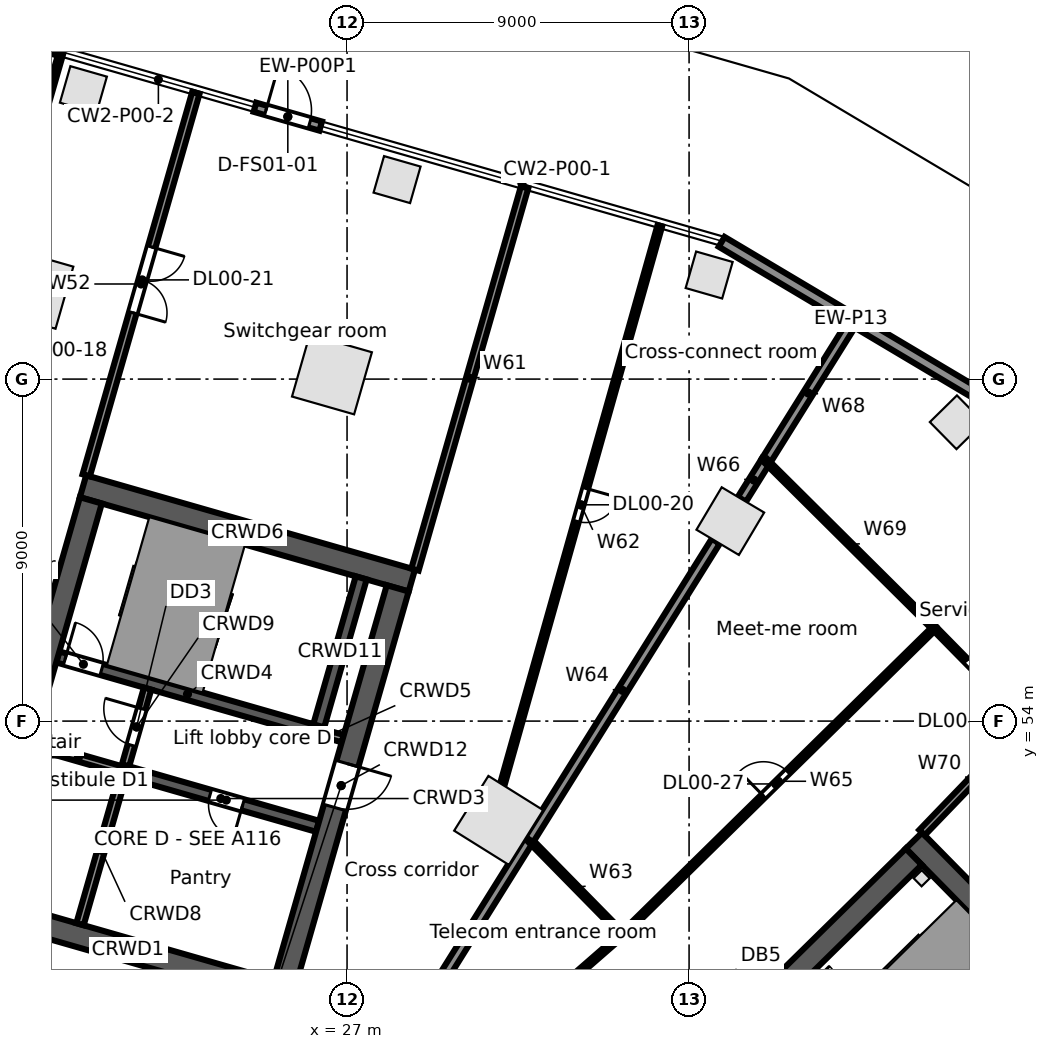
"""IFC4 building model, lengths in metres.
Left out: names, types, materials, properties, quantities, classifications, styles, units other than length and angle.
Written with IfcOpenShell. Run it as: python <this file> out.ifc"""

import sys

from ifc_helpers import new_model, si_unit, direction, frame, frame_2d, origin, origin_2d, place, context, subcontext, project, spatial, rectangle, extrude, element, fill, save


model = new_model("IFC4")
c1 = context("Model", 3, precision=1e-05, world=origin(), true_north=direction((0.0, 1.0)))
c2 = subcontext(c1, "Body", "Model", "MODEL_VIEW")
j1 = project(units=[si_unit("LENGTHUNIT", "METRE"), si_unit("PLANEANGLEUNIT", "RADIAN")], contexts=[c1])
p1 = place(None, origin())
s1 = spatial("IfcSite", under=j1, at=p1, CompositionType="ELEMENT")
p2 = place(p1, origin())
s2 = spatial("IfcBuilding", under=s1, at=p2, CompositionType="ELEMENT")
p3 = place(p2, origin())
s3 = spatial("IfcBuildingStorey", under=s2, at=p3, CompositionType="ELEMENT", Elevation=0.0)
p4 = place(p3, frame((37.085, 59.262, 0.0), z_axis=(0.0, 0.0, 1.0), x_axis=(-0.859406411501, 0.511293086077, 0.0)))
e1 = element("IfcColumn", 1, at=p4, inside=s3, PredefinedType="COLUMN", context=c2, shape_type="SweptSolid", body=[
    extrude(rectangle(XDim=1.3, YDim=1.3, at=origin_2d()), origin(), (0.0, 0.0, 1.0), 6.5),
])
for number, where, z_axis, x_axis in (
    (2, (26.603, 63.124, 0.0), (0.0, 0.0, 1.0), (-0.961, 0.276, 0.0)),
    (3, (18.746, 65.376, 0.0), (0.0, 0.0, 1.0), (-0.961, 0.276, 0.0)),
    (4, (30.99, 51.386, 0.0), (0.0, 0.0, 1.0), (0.53, 0.848, 0.0)),
):
    element("IfcColumn", number, at=place(p3, frame(where, z_axis=z_axis, x_axis=x_axis)), inside=s3, PredefinedType="COLUMN", context=c2, shape_type="SweptSolid", body=[
        extrude(rectangle(XDim=1.7, YDim=1.7, at=origin_2d()), origin(), (0.0, 0.0, 1.0), 6.5),
    ])
for number, where, z_axis, x_axis in (
    (5, (36.528, 65.739, 0.0), (0.0, 0.0, 1.0), (-0.961, 0.276, 0.0)),
    (6, (28.316, 68.25, 0.0), (0.0, 0.0, 1.0), (-0.961, 0.276, 0.0)),
    (7, (20.062, 70.616, 0.0), (0.0, 0.0, 1.0), (-0.961, 0.276, 0.0)),
    (8, (43.042, 61.863, 0.0), (0.0, 0.0, 1.0), (-0.701, 0.713, 0.0)),
):
    element("IfcColumn", number, at=place(p3, frame(where, z_axis=z_axis, x_axis=x_axis)), inside=s3, PredefinedType="COLUMN", context=c2, shape_type="SweptSolid", body=[
        extrude(rectangle(XDim=1.0, YDim=1.0, at=origin_2d()), origin(), (0.0, 0.0, 1.0), 6.5),
    ])
p5 = place(p3, frame((36.858, 66.612, 0.0), z_axis=(0.0, 0.0, 1.0), x_axis=(0.85940790562, -0.51129057468, 0.0)))
e9 = element("IfcWall", 9, at=p5, inside=s3, PredefinedType="STANDARD", context=c2, shape_type="SweptSolid", body=[
    extrude(rectangle(XDim=7.906, YDim=0.3, at=frame_2d((3.953, 0.0))), origin(), (0.0, 0.0, 1.0), 6.15),
])
p6 = place(p3, frame((24.576, 70.154, 0.0), z_axis=(0.0, 0.0, 1.0), x_axis=(0.961267609379, -0.275616732363, 0.0)))
e10 = element("IfcWall", 10, at=p6, inside=s3, PredefinedType="STANDARD", context=c2, shape_type="SweptSolid", body=[
    extrude(rectangle(XDim=1.8, YDim=0.25, at=frame_2d((0.9, 0.0))), origin(), (0.0, 0.0, 1.0), 6.15),
])
p7 = place(p6, frame((0.3, 0.0, 0.0)))
e11 = element("IfcOpeningElement", 11, at=p7, cuts=e10, PredefinedType="OPENING", context=c2, shape_type="SweptSolid", body=[
    extrude(rectangle(XDim=1.2, YDim=2.4, at=frame_2d((0.6, 1.2))), frame((0.0, 0.135, 0.0), z_axis=(0.0, -1.0, 0.0), x_axis=(1.0, 0.0, 0.0)), (0.0, 0.0, 1.0), 0.27),
])
p8 = place(p3, frame((14.881, 72.935, 0.0), z_axis=(0.0, 0.0, 1.0), x_axis=(0.961254793179, -0.275661427462, 0.0)))
e12 = element("IfcWall", 12, at=p8, inside=s3, PredefinedType="STANDARD", context=c2, shape_type="SweptSolid", body=[
    extrude(rectangle(XDim=4.8, YDim=0.25, at=frame_2d((2.4, 0.0))), origin(), (0.0, 0.0, 1.0), 6.15),
])
p9 = place(p8, frame((1.2, 0.0, 0.0)))
e13 = element("IfcOpeningElement", 13, at=p9, cuts=e12, PredefinedType="OPENING", context=c2, shape_type="SweptSolid", body=[
    extrude(rectangle(XDim=2.4, YDim=2.7, at=frame_2d((1.2, 1.35))), frame((0.0, 0.135, 0.0), z_axis=(0.0, -1.0, 0.0), x_axis=(1.0, 0.0, 0.0)), (0.0, 0.0, 1.0), 0.27),
])
p10 = place(p3, frame((41.917, 50.856, 0.0), z_axis=(0.0, 0.0, 1.0), x_axis=(0.700911255944, -0.713248491965, 0.0)))
e14 = element("IfcWall", 14, at=p10, inside=s3, PredefinedType="SOLIDWALL", context=c2, shape_type="SweptSolid", body=[
    extrude(rectangle(XDim=15.0, YDim=0.6, at=frame_2d((7.5, 0.0))), origin(), (0.0, 0.0, 1.0), 6.15),
])
p11 = place(p3, frame((32.07, 40.759, 0.0), z_axis=(0.0, 0.0, 1.0), x_axis=(0.713245344712, 0.70091445858, 0.0)))
e15 = element("IfcWall", 15, at=p11, inside=s3, PredefinedType="SOLIDWALL", context=c2, shape_type="SweptSolid", body=[
    extrude(rectangle(XDim=13.8, YDim=0.6, at=frame_2d((6.9, 0.0))), origin(), (0.0, 0.0, 1.0), 6.15),
])
p12 = place(p11, frame((6.3, 0.0, 0.0)))
e16 = element("IfcOpeningElement", 16, at=p12, cuts=e15, PredefinedType="OPENING", context=c2, shape_type="SweptSolid", body=[
    extrude(rectangle(XDim=1.2, YDim=2.1, at=frame_2d((0.6, 1.05))), frame((0.0, 0.31, 0.0), z_axis=(0.0, -1.0, 0.0), x_axis=(1.0, 0.0, 0.0)), (0.0, 0.0, 1.0), 0.62),
])
p13 = place(p3, frame((16.911, 49.221, 0.0), z_axis=(0.0, 0.0, 1.0), x_axis=(0.96126248289, -0.275634611374, 0.0)))
e17 = element("IfcWall", 17, at=p13, inside=s3, PredefinedType="SOLIDWALL", context=c2, shape_type="SweptSolid", body=[
    extrude(rectangle(XDim=9.0, YDim=0.6, at=frame_2d((4.5, 0.0))), origin(), (0.0, 0.0, 1.0), 6.15),
])
p14 = place(p3, frame((18.728, 53.382, 0.0), z_axis=(0.0, 0.0, 1.0), x_axis=(0.961247070632, -0.275688355216, 0.0)))
e18 = element("IfcWall", 18, at=p14, inside=s3, PredefinedType="SOLIDWALL", context=c2, shape_type="SweptSolid", body=[
    extrude(rectangle(XDim=2.5, YDim=0.2, at=frame_2d((1.25, 0.0))), origin(), (0.0, 0.0, 1.0), 6.15),
])
p15 = place(p3, frame((21.131, 52.692, 0.0), z_axis=(0.0, 0.0, 1.0), x_axis=(0.961271492568, -0.275603188616, 0.0)))
e19 = element("IfcWall", 19, at=p15, inside=s3, PredefinedType="SOLIDWALL", context=c2, shape_type="SweptSolid", body=[
    extrude(rectangle(XDim=5.3, YDim=0.3, at=frame_2d((2.65, 0.0))), origin(), (0.0, 0.0, 1.0), 6.15),
])
p16 = place(p15, frame((2.35, 0.0, 0.0)))
e20 = element("IfcOpeningElement", 20, at=p16, cuts=e19, PredefinedType="OPENING", context=c2, shape_type="SweptSolid", body=[
    extrude(rectangle(XDim=0.9, YDim=2.1, at=frame_2d((0.45, 1.05))), frame((0.0, 0.16, 0.0), z_axis=(0.0, -1.0, 0.0), x_axis=(1.0, 0.0, 0.0)), (0.0, 0.0, 1.0), 0.32),
])
p17 = place(p3, frame((19.389, 55.689, 0.0), z_axis=(0.0, 0.0, 1.0), x_axis=(0.961261397636, -0.275638396117, 0.0)))
e21 = element("IfcWall", 21, at=p17, inside=s3, PredefinedType="SOLIDWALL", context=c2, shape_type="SweptSolid", body=[
    extrude(rectangle(XDim=7.1, YDim=0.3, at=frame_2d((3.55, 0.0))), origin(), (0.0, 0.0, 1.0), 6.15),
])
p18 = place(p17, frame((0.2, 0.0, 0.0)))
e22 = element("IfcOpeningElement", 22, at=p18, cuts=e21, PredefinedType="OPENING", context=c2, shape_type="SweptSolid", body=[
    extrude(rectangle(XDim=1.0, YDim=2.1, at=frame_2d((0.5, 1.05))), frame((0.0, 0.16, 0.0), z_axis=(0.0, -1.0, 0.0), x_axis=(1.0, 0.0, 0.0)), (0.0, 0.0, 1.0), 0.32),
])
p19 = place(p3, frame((26.214, 53.732, 0.0), z_axis=(0.0, 0.0, 1.0), x_axis=(0.96122076476, -0.27578005982, 0.0)))
e23 = element("IfcWall", 23, at=p19, inside=s3, PredefinedType="SOLIDWALL", context=c2, shape_type="SweptSolid", body=[
    extrude(rectangle(XDim=0.7, YDim=0.2, at=frame_2d((0.35, 0.0))), origin(), (0.0, 0.0, 1.0), 6.15),
])
p20 = place(p3, frame((20.053, 60.18, 0.0), z_axis=(0.0, 0.0, 1.0), x_axis=(0.96126248289, -0.275634611374, 0.0)))
e24 = element("IfcWall", 24, at=p20, inside=s3, PredefinedType="SOLIDWALL", context=c2, shape_type="SweptSolid", body=[
    extrude(rectangle(XDim=9.0, YDim=0.6, at=frame_2d((4.5, 0.0))), origin(), (0.0, 0.0, 1.0), 6.15),
])
p21 = place(p3, frame((17.282, 49.427, 0.0), z_axis=(0.0, 0.0, 1.0), x_axis=(0.275631631629, 0.961263337304, 0.0)))
e25 = element("IfcWall", 25, at=p21, inside=s3, PredefinedType="SOLIDWALL", context=c2, shape_type="SweptSolid", body=[
    extrude(rectangle(XDim=10.8, YDim=0.6, at=frame_2d((5.4, 0.0))), origin(), (0.0, 0.0, 1.0), 6.15),
])
p22 = place(p21, frame((4.8, 0.0, 0.0)))
e26 = element("IfcOpeningElement", 26, at=p22, cuts=e25, PredefinedType="OPENING", context=c2, shape_type="SweptSolid", body=[
    extrude(rectangle(XDim=1.2, YDim=2.1, at=frame_2d((0.6, 1.05))), frame((0.0, 0.31, 0.0), z_axis=(0.0, -1.0, 0.0), x_axis=(1.0, 0.0, 0.0)), (0.0, 0.0, 1.0), 0.62),
])
p23 = place(p3, frame((19.973, 48.655, 0.0), z_axis=(0.0, 0.0, 1.0), x_axis=(0.275668441653, 0.961252781674, 0.0)))
e27 = element("IfcWall", 27, at=p23, inside=s3, PredefinedType="SOLIDWALL", context=c2, shape_type="SweptSolid", body=[
    extrude(rectangle(XDim=4.05, YDim=0.2, at=frame_2d((2.025, 0.0))), origin(), (0.0, 0.0, 1.0), 6.15),
])
p24 = place(p3, frame((21.172, 52.837, 0.0), z_axis=(0.0, 0.0, 1.0), x_axis=(0.275657676022, 0.961255868981, 0.0)))
e28 = element("IfcWall", 28, at=p24, inside=s3, PredefinedType="PARTITIONING", context=c2, shape_type="SweptSolid", body=[
    extrude(rectangle(XDim=2.1, YDim=0.2, at=frame_2d((1.05, 0.0))), origin(), (0.0, 0.0, 1.0), 6.15),
])
p25 = place(p24, frame((0.55, 0.0, 0.0)))
e29 = element("IfcOpeningElement", 29, at=p25, cuts=e28, PredefinedType="OPENING", context=c2, shape_type="SweptSolid", body=[
    extrude(rectangle(XDim=1.0, YDim=2.1, at=frame_2d((0.5, 1.05))), frame((0.0, 0.11, 0.0), z_axis=(0.0, -1.0, 0.0), x_axis=(1.0, 0.0, 0.0)), (0.0, 0.0, 1.0), 0.22),
])
p26 = place(p3, frame((26.256, 53.876, 0.0), z_axis=(0.0, 0.0, 1.0), x_axis=(0.275612739511, 0.961268754209, 0.0)))
e30 = element("IfcWall", 30, at=p26, inside=s3, PredefinedType="SOLIDWALL", context=c2, shape_type="SweptSolid", body=[
    extrude(rectangle(XDim=4.05, YDim=0.3, at=frame_2d((2.025, 0.0))), origin(), (0.0, 0.0, 1.0), 6.15),
])
p27 = place(p3, frame((25.356, 47.112, 0.0), z_axis=(0.0, 0.0, 1.0), x_axis=(0.275631631629, 0.961263337304, 0.0)))
e31 = element("IfcWall", 31, at=p27, inside=s3, PredefinedType="SOLIDWALL", context=c2, shape_type="SweptSolid", body=[
    extrude(rectangle(XDim=10.8, YDim=0.6, at=frame_2d((5.4, 0.0))), origin(), (0.0, 0.0, 1.0), 6.15),
])
p28 = place(p27, frame((4.8, 0.0, 0.0)))
e32 = element("IfcOpeningElement", 32, at=p28, cuts=e31, PredefinedType="OPENING", context=c2, shape_type="SweptSolid", body=[
    extrude(rectangle(XDim=1.2, YDim=2.1, at=frame_2d((0.6, 1.05))), frame((0.0, 0.31, 0.0), z_axis=(0.0, -1.0, 0.0), x_axis=(1.0, 0.0, 0.0)), (0.0, 0.0, 1.0), 0.62),
])
p29 = place(p3, frame((42.12, 49.864, 0.0), z_axis=(0.0, 0.0, 1.0), x_axis=(0.7009092643, -0.713250449154, 0.0)))
e33 = element("IfcColumn", 33, at=p29, inside=s3, PredefinedType="COLUMN", context=c2, shape_type="SweptSolid", body=[
    extrude(rectangle(XDim=0.3, YDim=0.3, at=origin_2d()), origin(), (0.0, 0.0, 1.0), 3.05),
])
p30 = place(p3, frame((14.9, 55.728, 0.0), z_axis=(0.0, 0.0, 1.0), x_axis=(0.277168807321, 0.960821238446, 0.0)))
e34 = element("IfcWall", 34, at=p30, inside=s3, PredefinedType="PARTITIONING", context=c2, shape_type="SweptSolid", body=[
    extrude(rectangle(XDim=16.474, YDim=0.125, at=frame_2d((8.237, 0.0))), origin(), (0.0, 0.0, 1.0), 5.212),
])
p31 = place(p30, frame((7.45, 0.0, 0.0)))
e35 = element("IfcOpeningElement", 35, at=p31, cuts=e34, PredefinedType="OPENING", context=c2, shape_type="SweptSolid", body=[
    extrude(rectangle(XDim=1.8, YDim=2.1, at=frame_2d((0.9, 1.05))), frame((0.0, 0.073, 0.0), z_axis=(0.0, -1.0, 0.0), x_axis=(1.0, 0.0, 0.0)), (0.0, 0.0, 1.0), 0.145),
])
p32 = place(p3, frame((20.136, 60.468, 0.0), z_axis=(0.0, 0.0, 1.0), x_axis=(0.275610651454, 0.96126935289, 0.0)))
e36 = element("IfcWall", 36, at=p32, inside=s3, PredefinedType="PARTITIONING", context=c2, shape_type="SweptSolid", body=[
    extrude(rectangle(XDim=10.475, YDim=0.2, at=frame_2d((5.237, 0.0))), origin(), (0.0, 0.0, 1.0), 5.43),
])
p33 = place(p32, frame((4.45, 0.0, 0.0)))
e37 = element("IfcOpeningElement", 37, at=p33, cuts=e36, PredefinedType="OPENING", context=c2, shape_type="SweptSolid", body=[
    extrude(rectangle(XDim=1.8, YDim=2.1, at=frame_2d((0.9, 1.05))), frame((0.0, 0.11, 0.0), z_axis=(0.0, -1.0, 0.0), x_axis=(1.0, 0.0, 0.0)), (0.0, 0.0, 1.0), 0.22),
])
p34 = place(p3, frame((26.338, 41.492, 0.0), z_axis=(0.0, 0.0, 1.0), x_axis=(0.753866696092, 0.657027400131, 0.0)))
e38 = element("IfcWall", 38, at=p34, inside=s3, PredefinedType="PARTITIONING", context=c2, shape_type="SweptSolid", body=[
    extrude(rectangle(XDim=10.493, YDim=0.125, at=frame_2d((5.246, 0.0))), origin(), (0.0, 0.0, 1.0), 5.23),
])
p35 = place(p34, frame((4.7, 0.0, 0.0)))
e39 = element("IfcOpeningElement", 39, at=p35, cuts=e38, PredefinedType="OPENING", context=c2, shape_type="SweptSolid", body=[
    extrude(rectangle(XDim=0.9, YDim=2.1, at=frame_2d((0.45, 1.05))), frame((0.0, 0.073, 0.0), z_axis=(0.0, -1.0, 0.0), x_axis=(1.0, 0.0, 0.0)), (0.0, 0.0, 1.0), 0.145),
])
p36 = place(p3, frame((26.456, 42.338, 0.0), z_axis=(0.0, 0.0, 1.0), x_axis=(0.529866075757, 0.848081329686, 0.0)))
e40 = element("IfcWall", 40, at=p36, inside=s3, PredefinedType="PARTITIONING", context=c2, shape_type="SweptSolid", body=[
    extrude(rectangle(XDim=10.076, YDim=0.25, at=frame_2d((5.038, 0.0))), origin(), (0.0, 0.0, 1.0), 5.212),
])
p37 = place(p3, frame((28.787, 57.987, 0.0), z_axis=(0.0, 0.0, 1.0), x_axis=(0.2756782675, 0.96124996376, 0.0)))
e41 = element("IfcWall", 41, at=p37, inside=s3, PredefinedType="PARTITIONING", context=c2, shape_type="SweptSolid", body=[
    extrude(rectangle(XDim=10.476, YDim=0.2, at=frame_2d((5.238, 0.0))), origin(), (0.0, 0.0, 1.0), 5.422),
])
p38 = place(p3, frame((31.084, 52.329, 0.0), z_axis=(0.0, 0.0, 1.0), x_axis=(0.271372887947, 0.962474288325, 0.0)))
e42 = element("IfcWall", 42, at=p38, inside=s3, PredefinedType="PARTITIONING", context=c2, shape_type="SweptSolid", body=[
    extrude(rectangle(XDim=15.281, YDim=0.125, at=frame_2d((7.641, 0.0))), origin(), (0.0, 0.0, 1.0), 5.422),
])
p39 = place(p38, frame((7.2, 0.0, 0.0)))
e43 = element("IfcOpeningElement", 43, at=p39, cuts=e42, PredefinedType="OPENING", context=c2, shape_type="SweptSolid", body=[
    extrude(rectangle(XDim=0.9, YDim=2.1, at=frame_2d((0.45, 1.05))), frame((0.0, 0.073, 0.0), z_axis=(0.0, -1.0, 0.0), x_axis=(1.0, 0.0, 0.0)), (0.0, 0.0, 1.0), 0.145),
])
p40 = place(p3, frame((31.795, 50.883, 0.0), z_axis=(0.0, 0.0, 1.0), x_axis=(0.700801832867, -0.713356005828, 0.0)))
e44 = element("IfcWall", 44, at=p40, inside=s3, PredefinedType="PARTITIONING", context=c2, shape_type="SweptSolid", body=[
    extrude(rectangle(XDim=3.5, YDim=0.125, at=frame_2d((1.75, 0.0))), origin(), (0.0, 0.0, 1.0), 5.23),
])
p41 = place(p3, frame((31.795, 50.883, 0.0), z_axis=(0.0, 0.0, 1.0), x_axis=(0.530015532415, 0.847987933522, 0.0)))
e45 = element("IfcWall", 45, at=p41, inside=s3, PredefinedType="PARTITIONING", context=c2, shape_type="SweptSolid", body=[
    extrude(rectangle(XDim=9.258, YDim=0.25, at=frame_2d((4.629, 0.0))), origin(), (0.0, 0.0, 1.0), 5.23),
])
p42 = place(p3, frame((34.248, 48.386, 0.0), z_axis=(0.0, 0.0, 1.0), x_axis=(0.713246685355, 0.700913094349, 0.0)))
e46 = element("IfcWall", 46, at=p42, inside=s3, PredefinedType="PARTITIONING", context=c2, shape_type="SweptSolid", body=[
    extrude(rectangle(XDim=11.501, YDim=0.125, at=frame_2d((5.75, 0.0))), origin(), (0.0, 0.0, 1.0), 5.33),
])
p43 = place(p42, frame((5.2, 0.0, 0.0)))
e47 = element("IfcOpeningElement", 47, at=p43, cuts=e46, PredefinedType="OPENING", context=c2, shape_type="SweptSolid", body=[
    extrude(rectangle(XDim=0.9, YDim=2.1, at=frame_2d((0.45, 1.05))), frame((0.0, 0.073, 0.0), z_axis=(0.0, -1.0, 0.0), x_axis=(1.0, 0.0, 0.0)), (0.0, 0.0, 1.0), 0.145),
])
p44 = place(p3, frame((37.391, 59.837, 0.0), z_axis=(0.0, 0.0, 1.0), x_axis=(0.529759350496, 0.848148000388, 0.0)))
e48 = element("IfcWall", 48, at=p44, inside=s3, PredefinedType="PARTITIONING", context=c2, shape_type="SweptSolid", body=[
    extrude(rectangle(XDim=1.191, YDim=0.25, at=frame_2d((0.595, 0.0))), origin(), (0.0, 0.0, 1.0), 6.15),
])
p45 = place(p3, frame((38.022, 60.847, 0.0), z_axis=(0.0, 0.0, 1.0), x_axis=(0.52983736322, 0.848099268091, 0.0)))
e49 = element("IfcWall", 49, at=p45, inside=s3, PredefinedType="PARTITIONING", context=c2, shape_type="SweptSolid", body=[
    extrude(rectangle(XDim=4.211, YDim=0.25, at=frame_2d((2.105, 0.0))), origin(), (0.0, 0.0, 1.0), 5.524),
])
p46 = place(p3, frame((38.022, 60.847, 0.0), z_axis=(0.0, 0.0, 1.0), x_axis=(0.709429785506, -0.704776120081, 0.0)))
e50 = element("IfcWall", 50, at=p46, inside=s3, PredefinedType="PARTITIONING", context=c2, shape_type="SweptSolid", body=[
    extrude(rectangle(XDim=6.243, YDim=0.125, at=frame_2d((3.122, 0.0))), origin(), (0.0, 0.0, 1.0), 5.518),
])
p47 = place(p3, frame((42.13, 51.066, 0.0), z_axis=(0.0, 0.0, 1.0), x_axis=(0.693124563472, 0.720817826855, 0.0)))
e51 = element("IfcWall", 51, at=p47, inside=s3, PredefinedType="PARTITIONING", context=c2, shape_type="SweptSolid", body=[
    extrude(rectangle(XDim=4.002, YDim=0.2, at=frame_2d((2.001, 0.0))), origin(), (0.0, 0.0, 1.0), 5.33),
])
p48 = place(p3, frame((42.451, 56.447, 0.0), z_axis=(0.0, 0.0, 1.0), x_axis=(0.700941316052, -0.713218950569, 0.0)))
e52 = element("IfcWall", 52, at=p48, inside=s3, PredefinedType="PARTITIONING", context=c2, shape_type="SweptSolid", body=[
    extrude(rectangle(XDim=3.5, YDim=0.125, at=frame_2d((1.75, 0.0))), origin(), (0.0, 0.0, 1.0), 6.15),
])
p49 = place(p48, frame((1.2, 0.0, 0.0)))
e53 = element("IfcOpeningElement", 53, at=p49, cuts=e52, PredefinedType="OPENING", context=c2, shape_type="SweptSolid", body=[
    extrude(rectangle(XDim=0.9, YDim=2.1, at=frame_2d((0.45, 1.05))), frame((0.0, 0.073, 0.0), z_axis=(0.0, -1.0, 0.0), x_axis=(1.0, 0.0, 0.0)), (0.0, 0.0, 1.0), 0.145),
])
p50 = place(p7, origin())
e54 = element("IfcDoor", 54, at=p50, inside=s3, OperationType="SINGLE_SWING_LEFT", PredefinedType="DOOR", context=c2, shape_type="SweptSolid", body=[
    extrude(rectangle(XDim=1.2, YDim=2.4, at=frame_2d((0.6, 1.2))), frame((0.0, 0.025, 0.0), z_axis=(0.0, -1.0, 0.0), x_axis=(1.0, 0.0, 0.0)), (0.0, 0.0, 1.0), 0.05),
])
fill(e11, e54)
p51 = place(p18, origin())
e55 = element("IfcDoor", 55, at=p51, inside=s3, OperationType="SINGLE_SWING_LEFT", PredefinedType="DOOR", context=c2, shape_type="SweptSolid", body=[
    extrude(rectangle(XDim=1.0, YDim=2.1, at=frame_2d((0.5, 1.05))), frame((0.0, 0.025, 0.0), z_axis=(0.0, -1.0, 0.0), x_axis=(1.0, 0.0, 0.0)), (0.0, 0.0, 1.0), 0.05),
])
fill(e22, e55)
p52 = place(p25, origin())
e56 = element("IfcDoor", 56, at=p52, inside=s3, OperationType="SINGLE_SWING_RIGHT", PredefinedType="DOOR", context=c2, shape_type="SweptSolid", body=[
    extrude(rectangle(XDim=1.0, YDim=2.1, at=frame_2d((0.5, 1.05))), frame((0.0, 0.025, 0.0), z_axis=(0.0, -1.0, 0.0), x_axis=(1.0, 0.0, 0.0)), (0.0, 0.0, 1.0), 0.05),
])
fill(e29, e56)
p53 = place(p28, frame((1.2, 0.0, 0.0), z_axis=(0.0, 0.0, 1.0), x_axis=(-1.0, 0.0, 0.0)))
e57 = element("IfcDoor", 57, at=p53, inside=s3, OperationType="SINGLE_SWING_LEFT", PredefinedType="DOOR", context=c2, shape_type="SweptSolid", body=[
    extrude(rectangle(XDim=1.2, YDim=2.1, at=frame_2d((0.6, 1.05))), frame((0.0, 0.025, 0.0), z_axis=(0.0, -1.0, 0.0), x_axis=(1.0, 0.0, 0.0)), (0.0, 0.0, 1.0), 0.05),
])
fill(e32, e57)
p54 = place(p16, frame((0.9, 0.0, 0.0), z_axis=(0.0, 0.0, 1.0), x_axis=(-1.0, 0.0, 0.0)))
e58 = element("IfcDoor", 58, at=p54, inside=s3, OperationType="SINGLE_SWING_LEFT", PredefinedType="DOOR", context=c2, shape_type="SweptSolid", body=[
    extrude(rectangle(XDim=0.9, YDim=2.1, at=frame_2d((0.45, 1.05))), frame((0.0, 0.025, 0.0), z_axis=(0.0, -1.0, 0.0), x_axis=(1.0, 0.0, 0.0)), (0.0, 0.0, 1.0), 0.05),
])
fill(e20, e58)
p55 = place(p39, frame((0.9, 0.0, 0.0), z_axis=(0.0, 0.0, 1.0), x_axis=(-1.0, 0.0, 0.0)))
e59 = element("IfcDoor", 59, at=p55, inside=s3, OperationType="SINGLE_SWING_LEFT", PredefinedType="DOOR", context=c2, shape_type="SweptSolid", body=[
    extrude(rectangle(XDim=0.9, YDim=2.1, at=frame_2d((0.45, 1.05))), frame((0.0, 0.025, 0.0), z_axis=(0.0, -1.0, 0.0), x_axis=(1.0, 0.0, 0.0)), (0.0, 0.0, 1.0), 0.05),
])
fill(e43, e59)
p56 = place(p33, frame((1.8, 0.0, 0.0), z_axis=(0.0, 0.0, 1.0), x_axis=(-1.0, 0.0, 0.0)))
e60 = element("IfcDoor", 60, at=p56, inside=s3, OperationType="DOUBLE_DOOR_SINGLE_SWING", PredefinedType="DOOR", context=c2, shape_type="SweptSolid", body=[
    extrude(rectangle(XDim=1.8, YDim=2.1, at=frame_2d((0.9, 1.05))), frame((0.0, 0.025, 0.0), z_axis=(0.0, -1.0, 0.0), x_axis=(1.0, 0.0, 0.0)), (0.0, 0.0, 1.0), 0.05),
])
fill(e37, e60)
p57 = place(p49, origin())
e61 = element("IfcDoor", 61, at=p57, inside=s3, OperationType="SINGLE_SWING_LEFT", PredefinedType="DOOR", context=c2, shape_type="SweptSolid", body=[
    extrude(rectangle(XDim=0.9, YDim=2.1, at=frame_2d((0.45, 1.05))), frame((0.0, 0.025, 0.0), z_axis=(0.0, -1.0, 0.0), x_axis=(1.0, 0.0, 0.0)), (0.0, 0.0, 1.0), 0.05),
])
fill(e53, e61)
p58 = place(p43, origin())
e62 = element("IfcDoor", 62, at=p58, inside=s3, OperationType="SINGLE_SWING_LEFT", PredefinedType="DOOR", context=c2, shape_type="SweptSolid", body=[
    extrude(rectangle(XDim=0.9, YDim=2.1, at=frame_2d((0.45, 1.05))), frame((0.0, 0.025, 0.0), z_axis=(0.0, -1.0, 0.0), x_axis=(1.0, 0.0, 0.0)), (0.0, 0.0, 1.0), 0.05),
])
fill(e47, e62)
save(model, sys.argv[1])
